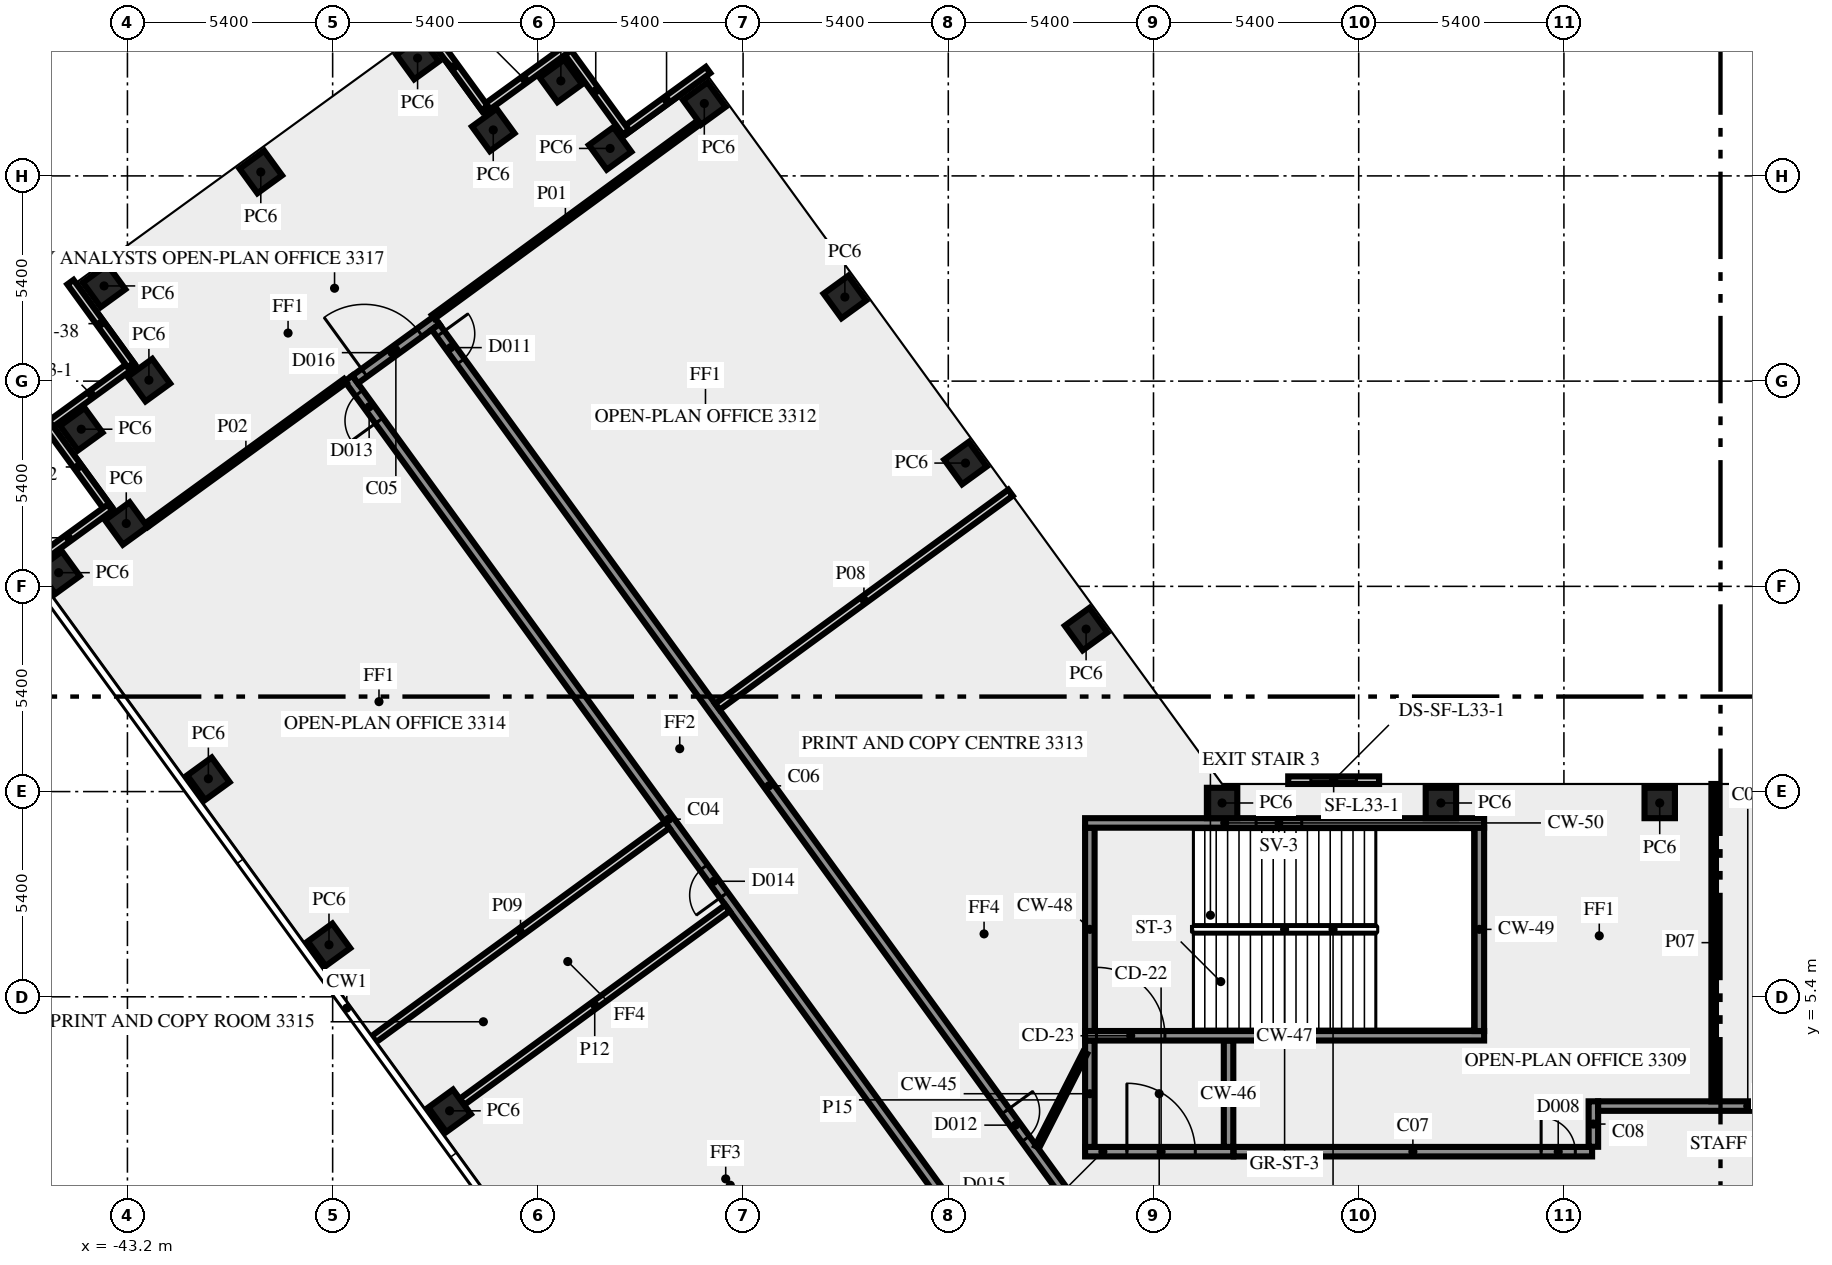
"""IFC4 building model, lengths in metres.
Left out: names, types, materials, properties, quantities, classifications, styles, units other than length and angle.
Written with IfcOpenShell. Run it as: python <this file> out.ifc"""

import sys

from ifc_helpers import new_model, si_unit, direction, frame, frame_2d, origin, origin_2d, place, context, subcontext, project, spatial, rectangle, extrude, element, fill, save


model = new_model("IFC4")
c1 = context("Model", 3, precision=1e-05, world=origin(), true_north=direction((0.0, 1.0)))
c2 = subcontext(c1, "Body", "Model", "MODEL_VIEW")
j1 = project(units=[si_unit("LENGTHUNIT", "METRE"), si_unit("PLANEANGLEUNIT", "RADIAN")], contexts=[c1])
p1 = place(None, origin())
s1 = spatial("IfcSite", under=j1, at=p1, CompositionType="ELEMENT")
p2 = place(p1, origin())
s2 = spatial("IfcBuilding", under=s1, at=p2, CompositionType="ELEMENT")
p3 = place(p2, frame((0.0, 0.0, 144.0)))
s3 = spatial("IfcBuildingStorey", under=s2, at=p3, CompositionType="ELEMENT", Elevation=144.0)
for number, where, z_axis, x_axis in (
    (1, (-17.974, 15.075, 0.0), (0.0, 0.0, 1.0), (-0.588, 0.809, 0.0)),
    (2, (-21.147, 19.444, 0.0), (0.0, 0.0, 1.0), (-0.588, 0.809, 0.0)),
    (3, (-24.321, 23.812, 0.0), (0.0, 0.0, 1.0), (-0.588, 0.809, 0.0)),
    (4, (-28.02, 28.905, 0.0), (0.0, 0.0, 1.0), (-0.809, -0.588, 0.0)),
    (5, (-30.499, 27.723, 0.0), (0.0, 0.0, 1.0), (-0.809, -0.588, 0.0)),
    (6, (-31.795, 29.5, 0.0), (0.0, 0.0, 1.0), (-0.588, 0.809, 0.0)),
    (7, (-33.574, 28.209, 0.0), (0.0, 0.0, 1.0), (-0.588, 0.809, 0.0)),
    (8, (-35.565, 30.1, 0.0), (0.0, 0.0, 1.0), (-0.809, -0.588, 0.0)),
    (9, (-39.691, 27.102, 0.0), (0.0, 0.0, 1.0), (-0.809, -0.588, 0.0)),
    (10, (-43.815, 24.105, 0.0), (0.0, 0.0, 1.0), (-0.809, -0.588, 0.0)),
    (11, (-42.635, 21.626, 0.0), (0.0, 0.0, 1.0), (-0.809, -0.588, 0.0)),
    (12, (-44.415, 20.335, 0.0), (0.0, 0.0, 1.0), (0.588, -0.809, 0.0)),
    (13, (-43.231, 17.854, 0.0), (0.0, 0.0, 1.0), (0.588, -0.809, 0.0)),
    (14, (-45.01, 16.56, 0.0), (0.0, 0.0, 1.0), (0.588, -0.809, 0.0)),
    (15, (-41.07, 11.137, 0.0), (0.0, 0.0, 1.0), (0.588, -0.809, 0.0)),
    (16, (-37.896, 6.769, 0.0), (0.0, 0.0, 1.0), (0.588, -0.809, 0.0)),
    (17, (-34.722, 2.4, 0.0), (0.0, 0.0, 1.0), (0.588, -0.809, 0.0)),
    (18, (-2.879, 10.5, 0.0), (0.0, 0.0, 1.0), (-1.0, 0.0, 0.0)),
    (19, (-8.637, 10.5, 0.0), (0.0, 0.0, 1.0), (-1.0, 0.0, 0.0)),
    (20, (-14.395, 10.5, 0.0), (0.0, 0.0, 1.0), (-1.0, 0.0, 0.0)),
):
    element("IfcColumn", number, at=place(p3, frame(where, z_axis=z_axis, x_axis=x_axis)), inside=s3, PredefinedType="COLUMN", context=c2, shape_type="SweptSolid", body=[
        extrude(rectangle(XDim=0.8, YDim=0.8, at=origin_2d()), origin(), (0.0, 0.0, 1.0), 3.65),
    ])
for number, where, z_axis, x_axis in (
    (21, (-43.061, 22.043, 0.0), (0.0, 0.0, 1.0), (-0.809, -0.588, 0.0)),
    (22, (-45.296, 20.434, 0.0), (0.0, 0.0, 1.0), (0.588, -0.809, 0.0)),
    (23, (-43.658, 18.272, 0.0), (0.0, 0.0, 1.0), (-0.809, -0.588, 0.0)),
):
    element("IfcWall", number, at=place(p3, frame(where, z_axis=z_axis, x_axis=x_axis)), inside=s3, PredefinedType="SOLIDWALL", context=c2, shape_type="SweptSolid", body=[
        extrude(rectangle(XDim=2.7, YDim=0.2, at=frame_2d((1.35, 0.0))), origin(), (0.0, 0.0, 1.0), 3.65),
    ])
p4 = place(p3, frame((-10.263, 11.1, 0.0), z_axis=(0.0, 0.0, 1.0), x_axis=(-1.0, 0.0, 0.0)))
e24 = element("IfcWall", 24, at=p4, inside=s3, PredefinedType="SOLIDWALL", context=c2, shape_type="SweptSolid", body=[
    extrude(rectangle(XDim=2.392, YDim=0.2, at=frame_2d((1.196, 0.0))), origin(), (0.0, 0.0, 1.0), 3.65),
])
p5 = place(p4, frame((0.596, 0.0, 1.0)))
e25 = element("IfcOpeningElement", 25, at=p5, cuts=e24, PredefinedType="OPENING", context=c2, shape_type="SweptSolid", body=[
    extrude(rectangle(XDim=1.2, YDim=1.2, at=frame_2d((0.6, 0.6))), frame((0.0, 0.11, 0.0), z_axis=(0.0, -1.0, 0.0), x_axis=(1.0, 0.0, 0.0)), (0.0, 0.0, 1.0), 0.22),
])
for number, where, z_axis, x_axis in (
    (26, (-27.921, 29.787, 0.0), (0.0, 0.0, 1.0), (-0.809, -0.588, 0.0)),
    (27, (-30.083, 28.149, 0.0), (0.0, 0.0, 1.0), (-0.588, 0.809, 0.0)),
    (28, (-31.654, 30.331, 0.0), (0.0, 0.0, 1.0), (-0.809, -0.588, 0.0)),
    (29, (-33.801, 28.786, 0.0), (0.0, 0.0, 1.0), (-0.588, 0.809, 0.0)),
    (30, (-44.699, 24.205, 0.0), (0.0, 0.0, 1.0), (0.588, -0.809, 0.0)),
):
    element("IfcWall", number, at=place(p3, frame(where, z_axis=z_axis, x_axis=x_axis)), inside=s3, PredefinedType="SOLIDWALL", context=c2, shape_type="SweptSolid", body=[
        extrude(rectangle(XDim=2.7, YDim=0.2, at=frame_2d((1.35, 0.0))), origin(), (0.0, 0.0, 1.0), 3.65),
    ])
p6 = place(p3, frame((-18.0, 1.325, 0.0), z_axis=(0.0, 0.0, 1.0), x_axis=(1.0, 0.0, 0.0)))
e31 = element("IfcWall", 31, at=p6, inside=s3, PredefinedType="SHEAR", context=c2, shape_type="SweptSolid", body=[
    extrude(rectangle(XDim=3.9, YDim=0.25, at=frame_2d((1.95, 0.0))), origin(), (0.0, 0.0, 1.0), 3.65),
])
p7 = place(p6, frame((1.1, 0.0, 0.0)))
e32 = element("IfcOpeningElement", 32, at=p7, cuts=e31, PredefinedType="OPENING", context=c2, shape_type="SweptSolid", body=[
    extrude(rectangle(XDim=1.8, YDim=2.1, at=frame_2d((0.9, 1.05))), frame((0.0, 0.135, 0.0), z_axis=(0.0, -1.0, 0.0), x_axis=(1.0, 0.0, 0.0)), (0.0, 0.0, 1.0), 0.27),
])
for number, where, z_axis, x_axis in (
    (33, (-17.875, 1.45, 0.0), (0.0, 0.0, 1.0), (0.0, 1.0, 0.0)),
    (34, (-14.225, 1.45, 0.0), (0.0, 0.0, 1.0), (0.0, 1.0, 0.0)),
):
    element("IfcWall", number, at=place(p3, frame(where, z_axis=z_axis, x_axis=x_axis)), inside=s3, PredefinedType="SHEAR", context=c2, shape_type="SweptSolid", body=[
        extrude(rectangle(XDim=2.8, YDim=0.25, at=frame_2d((1.4, 0.0))), origin(), (0.0, 0.0, 1.0), 3.65),
    ])
p8 = place(p3, frame((-18.0, 4.375, 0.0), z_axis=(0.0, 0.0, 1.0), x_axis=(1.0, 0.0, 0.0)))
e35 = element("IfcWall", 35, at=p8, inside=s3, PredefinedType="SHEAR", context=c2, shape_type="SweptSolid", body=[
    extrude(rectangle(XDim=10.5, YDim=0.25, at=frame_2d((5.25, 0.0))), origin(), (0.0, 0.0, 1.0), 3.65),
])
p9 = place(p8, frame((0.3, 0.0, 0.0)))
e36 = element("IfcOpeningElement", 36, at=p9, cuts=e35, PredefinedType="OPENING", context=c2, shape_type="SweptSolid", body=[
    extrude(rectangle(XDim=1.8, YDim=2.1, at=frame_2d((0.9, 1.05))), frame((0.0, 0.135, 0.0), z_axis=(0.0, -1.0, 0.0), x_axis=(1.0, 0.0, 0.0)), (0.0, 0.0, 1.0), 0.27),
])
for number, where, z_axis, x_axis in (
    (37, (-17.875, 4.5, 0.0), (0.0, 0.0, 1.0), (0.0, 1.0, 0.0)),
    (38, (-7.625, 4.5, 0.0), (0.0, 0.0, 1.0), (0.0, 1.0, 0.0)),
):
    element("IfcWall", number, at=place(p3, frame(where, z_axis=z_axis, x_axis=x_axis)), inside=s3, PredefinedType="SHEAR", context=c2, shape_type="SweptSolid", body=[
        extrude(rectangle(XDim=5.35, YDim=0.25, at=frame_2d((2.675, 0.0))), origin(), (0.0, 0.0, 1.0), 3.65),
    ])
p10 = place(p3, frame((-18.0, 9.975, 0.0), z_axis=(0.0, 0.0, 1.0), x_axis=(1.0, 0.0, 0.0)))
e39 = element("IfcWall", 39, at=p10, inside=s3, PredefinedType="SHEAR", context=c2, shape_type="SweptSolid", body=[
    extrude(rectangle(XDim=10.5, YDim=0.25, at=frame_2d((5.25, 0.0))), origin(), (0.0, 0.0, 1.0), 3.65),
])
p11 = place(p10, frame((4.5, 0.0, 1.0)))
e40 = element("IfcOpeningElement", 40, at=p11, cuts=e39, PredefinedType="OPENING", context=c2, shape_type="SweptSolid", body=[
    extrude(rectangle(XDim=1.2, YDim=1.2, at=frame_2d((0.6, 0.6))), frame((0.0, 0.135, 0.0), z_axis=(0.0, -1.0, 0.0), x_axis=(1.0, 0.0, 0.0)), (0.0, 0.0, 1.0), 0.27),
])
p12 = place(p3, frame((-20.531, -1.523, 0.0), z_axis=(0.0, 0.0, 1.0), x_axis=(-0.587785812891, 0.809016587076, 0.0)))
e41 = element("IfcWall", 41, at=p12, inside=s3, PredefinedType="SOLIDWALL", context=c2, shape_type="SweptSolid", body=[
    extrude(rectangle(XDim=28.67, YDim=0.25, at=frame_2d((14.335, 0.0))), origin(), (0.0, 0.0, 1.0), 3.65),
])
p13 = place(p12, frame((27.296, 0.0, 0.0)))
e42 = element("IfcOpeningElement", 42, at=p13, cuts=e41, PredefinedType="OPENING", context=c2, shape_type="SweptSolid", body=[
    extrude(rectangle(XDim=0.9, YDim=2.1, at=frame_2d((0.45, 1.05))), frame((0.0, 0.135, 0.0), z_axis=(0.0, -1.0, 0.0), x_axis=(1.0, 0.0, 0.0)), (0.0, 0.0, 1.0), 0.27),
])
p14 = place(p12, frame((11.866, 0.0, 0.0)))
e43 = element("IfcOpeningElement", 43, at=p14, cuts=e41, PredefinedType="OPENING", context=c2, shape_type="SweptSolid", body=[
    extrude(rectangle(XDim=0.9, YDim=2.1, at=frame_2d((0.45, 1.05))), frame((0.0, 0.135, 0.0), z_axis=(0.0, -1.0, 0.0), x_axis=(1.0, 0.0, 0.0)), (0.0, 0.0, 1.0), 0.27),
])
p15 = place(p12, frame((0.533, 0.0, 0.0)))
e44 = element("IfcOpeningElement", 44, at=p15, cuts=e41, PredefinedType="OPENING", context=c2, shape_type="SweptSolid", body=[
    extrude(rectangle(XDim=0.9, YDim=2.1, at=frame_2d((0.45, 1.05))), frame((0.0, 0.135, 0.0), z_axis=(0.0, -1.0, 0.0), x_axis=(1.0, 0.0, 0.0)), (0.0, 0.0, 1.0), 0.27),
])
p16 = place(p3, frame((-37.208, 21.644, 0.0), z_axis=(0.0, 0.0, 1.0), x_axis=(0.809038743598, 0.587755315891, 0.0)))
e45 = element("IfcWall", 45, at=p16, inside=s3, PredefinedType="SOLIDWALL", context=c2, shape_type="SweptSolid", body=[
    extrude(rectangle(XDim=2.65, YDim=0.25, at=frame_2d((1.325, 0.0))), origin(), (0.0, 0.0, 1.0), 3.65),
])
p17 = place(p16, frame((0.3, 0.0, 0.0)))
e46 = element("IfcOpeningElement", 46, at=p17, cuts=e45, PredefinedType="OPENING", context=c2, shape_type="SweptSolid", body=[
    extrude(rectangle(XDim=1.8, YDim=2.1, at=frame_2d((0.9, 1.05))), frame((0.0, 0.135, 0.0), z_axis=(0.0, -1.0, 0.0), x_axis=(1.0, 0.0, 0.0)), (0.0, 0.0, 1.0), 0.27),
])
p18 = place(p3, frame((-35.092, 23.027, 0.0), z_axis=(0.0, 0.0, 1.0), x_axis=(0.587784076945, -0.809017848313, 0.0)))
e47 = element("IfcWall", 47, at=p18, inside=s3, PredefinedType="SOLIDWALL", context=c2, shape_type="SweptSolid", body=[
    extrude(rectangle(XDim=29.853, YDim=0.25, at=frame_2d((14.927, 0.0))), origin(), (0.0, 0.0, 1.0), 3.65),
])
p19 = place(p18, frame((0.224, 0.0, 0.0)))
e48 = element("IfcOpeningElement", 48, at=p19, cuts=e47, PredefinedType="OPENING", context=c2, shape_type="SweptSolid", body=[
    extrude(rectangle(XDim=0.9, YDim=2.1, at=frame_2d((0.45, 1.05))), frame((0.0, 0.135, 0.0), z_axis=(0.0, -1.0, 0.0), x_axis=(1.0, 0.0, 0.0)), (0.0, 0.0, 1.0), 0.27),
])
p20 = place(p18, frame((25.512, 0.0, 0.0)))
e49 = element("IfcOpeningElement", 49, at=p20, cuts=e47, PredefinedType="OPENING", context=c2, shape_type="SweptSolid", body=[
    extrude(rectangle(XDim=0.9, YDim=2.1, at=frame_2d((0.45, 1.05))), frame((0.0, 0.135, 0.0), z_axis=(0.0, -1.0, 0.0), x_axis=(1.0, 0.0, 0.0)), (0.0, 0.0, 1.0), 0.27),
])
p21 = place(p3, frame((-14.09, 1.325, 0.0), z_axis=(0.0, 0.0, 1.0), x_axis=(1.0, 0.0, 0.0)))
e50 = element("IfcWall", 50, at=p21, inside=s3, PredefinedType="SOLIDWALL", context=c2, shape_type="SweptSolid", body=[
    extrude(rectangle(XDim=9.431, YDim=0.25, at=frame_2d((4.716, 0.0))), origin(), (0.0, 0.0, 1.0), 3.65),
])
p22 = place(p21, frame((8.09, 0.0, 0.0)))
e51 = element("IfcOpeningElement", 51, at=p22, cuts=e50, PredefinedType="OPENING", context=c2, shape_type="SweptSolid", body=[
    extrude(rectangle(XDim=0.9, YDim=2.1, at=frame_2d((0.45, 1.05))), frame((0.0, 0.135, 0.0), z_axis=(0.0, -1.0, 0.0), x_axis=(1.0, 0.0, 0.0)), (0.0, 0.0, 1.0), 0.27),
])
p23 = place(p3, frame((-4.625, 1.454, 0.0), z_axis=(0.0, 0.0, 1.0), x_axis=(0.0, 1.0, 0.0)))
e52 = element("IfcWall", 52, at=p23, inside=s3, PredefinedType="SOLIDWALL", context=c2, shape_type="SweptSolid", body=[
    extrude(rectangle(XDim=1.196, YDim=0.25, at=frame_2d((0.598, 0.0))), origin(), (0.0, 0.0, 1.0), 3.65),
])
p24 = place(p3, frame((-4.5, 2.525, 0.0), z_axis=(0.0, 0.0, 1.0), x_axis=(1.0, 0.0, 0.0)))
e53 = element("IfcWall", 53, at=p24, inside=s3, PredefinedType="SOLIDWALL", context=c2, shape_type="SweptSolid", body=[
    extrude(rectangle(XDim=11.25, YDim=0.25, at=frame_2d((5.625, 0.0))), origin(), (0.0, 0.0, 1.0), 3.65),
])
p25 = place(p24, frame((4.689, 0.0, 0.0)))
e54 = element("IfcOpeningElement", 54, at=p25, cuts=e53, PredefinedType="OPENING", context=c2, shape_type="SweptSolid", body=[
    extrude(rectangle(XDim=0.9, YDim=2.1, at=frame_2d((0.45, 1.05))), frame((0.0, 0.135, 0.0), z_axis=(0.0, -1.0, 0.0), x_axis=(1.0, 0.0, 0.0)), (0.0, 0.0, 1.0), 0.27),
])
p26 = place(p3, frame((-35.154, 23.291, 0.0), z_axis=(0.0, 0.0, 1.0), x_axis=(0.806977317905, 0.590582431492, 0.0)))
e55 = element("IfcWall", 55, at=p26, inside=s3, PredefinedType="PARTITIONING", context=c2, shape_type="SweptSolid", body=[
    extrude(rectangle(XDim=8.62, YDim=0.12, at=frame_2d((4.31, 0.0))), origin(), (0.0, 0.0, 1.0), 3.65),
])
p27 = place(p3, frame((-42.698, 17.81, 0.0), z_axis=(0.0, 0.0, 1.0), x_axis=(0.80901688725, 0.587785399737, 0.0)))
e56 = element("IfcWall", 56, at=p27, inside=s3, PredefinedType="PARTITIONING", context=c2, shape_type="SweptSolid", body=[
    extrude(rectangle(XDim=6.465, YDim=0.12, at=frame_2d((3.232, 0.0))), origin(), (0.0, 0.0, 1.0), 3.65),
])
p28 = place(p3, frame((-1.459, 2.65, 0.0), z_axis=(0.0, 0.0, 1.0), x_axis=(0.0, 1.0, 0.0)))
e57 = element("IfcWall", 57, at=p28, inside=s3, PredefinedType="PARTITIONING", context=c2, shape_type="SweptSolid", body=[
    extrude(rectangle(XDim=8.35, YDim=0.12, at=frame_2d((4.175, 0.0))), origin(), (0.0, 0.0, 1.0), 2.85),
])
for number, where, z_axis, x_axis in (
    (58, (-27.676, 13.032, 0.0), (0.0, 0.0, 1.0), (0.808, 0.59, 0.0)),
    (59, (-36.712, 4.288, 0.0), (0.0, 0.0, 1.0), (0.808, 0.59, 0.0)),
):
    element("IfcWall", number, at=place(p3, frame(where, z_axis=z_axis, x_axis=x_axis)), inside=s3, PredefinedType="SOLIDWALL", context=c2, shape_type="SweptSolid", body=[
        extrude(rectangle(XDim=9.55, YDim=0.2, at=frame_2d((4.775, 0.0))), origin(), (0.0, 0.0, 1.0), 2.85),
    ])
p29 = place(p3, frame((-34.395, 2.638, 0.0), z_axis=(0.0, 0.0, 1.0), x_axis=(0.807657534767, 0.589651851973, 0.0)))
e60 = element("IfcWall", 60, at=p29, inside=s3, PredefinedType="SOLIDWALL", context=c2, shape_type="SweptSolid", body=[
    extrude(rectangle(XDim=8.644, YDim=0.2, at=frame_2d((4.322, 0.0))), origin(), (0.0, 0.0, 1.0), 3.65),
])
p30 = place(p3, frame((-19.261, 1.45, 0.0), z_axis=(0.0, 0.0, 1.0), x_axis=(0.453950796792, 0.891026752736, 0.0)))
e61 = element("IfcWall", 61, at=p30, inside=s3, PredefinedType="PARTITIONING", context=c2, shape_type="SweptSolid", body=[
    extrude(rectangle(XDim=2.778, YDim=0.12, at=frame_2d((1.389, 0.0))), origin(), (0.0, 0.0, 1.0), 3.65),
])
p31 = place(p5, origin())
e62 = element("IfcWindow", 62, at=p31, inside=s3, PartitioningType="SINGLE_PANEL", PredefinedType="WINDOW", context=c2, shape_type="SweptSolid", body=[
    extrude(rectangle(XDim=1.2, YDim=1.2, at=frame_2d((0.6, 0.6))), frame((0.0, 0.03, 0.0), z_axis=(0.0, -1.0, 0.0), x_axis=(1.0, 0.0, 0.0)), (0.0, 0.0, 1.0), 0.06),
])
fill(e25, e62)
p32 = place(p7, origin())
e63 = element("IfcDoor", 63, at=p32, inside=s3, OperationType="DOUBLE_DOOR_SINGLE_SWING", PredefinedType="DOOR", context=c2, shape_type="SweptSolid", body=[
    extrude(rectangle(XDim=1.8, YDim=2.1, at=frame_2d((0.9, 1.05))), frame((0.0, 0.025, 0.0), z_axis=(0.0, -1.0, 0.0), x_axis=(1.0, 0.0, 0.0)), (0.0, 0.0, 1.0), 0.05),
])
fill(e32, e63)
p33 = place(p9, origin())
e64 = element("IfcDoor", 64, at=p33, inside=s3, OperationType="DOUBLE_DOOR_SINGLE_SWING", PredefinedType="DOOR", context=c2, shape_type="SweptSolid", body=[
    extrude(rectangle(XDim=1.8, YDim=2.1, at=frame_2d((0.9, 1.05))), frame((0.0, 0.025, 0.0), z_axis=(0.0, -1.0, 0.0), x_axis=(1.0, 0.0, 0.0)), (0.0, 0.0, 1.0), 0.05),
])
fill(e36, e64)
p34 = place(p11, origin())
e65 = element("IfcWindow", 65, at=p34, inside=s3, PartitioningType="SINGLE_PANEL", PredefinedType="WINDOW", context=c2, shape_type="SweptSolid", body=[
    extrude(rectangle(XDim=1.2, YDim=1.2, at=frame_2d((0.6, 0.6))), frame((0.0, 0.03, 0.0), z_axis=(0.0, -1.0, 0.0), x_axis=(1.0, 0.0, 0.0)), (0.0, 0.0, 1.0), 0.06),
])
fill(e40, e65)
p35 = place(p17, origin())
e66 = element("IfcDoor", 66, at=p35, inside=s3, OperationType="DOUBLE_DOOR_SINGLE_SWING", PredefinedType="DOOR", context=c2, shape_type="SweptSolid", body=[
    extrude(rectangle(XDim=1.8, YDim=2.1, at=frame_2d((0.9, 1.05))), frame((0.0, 0.025, 0.0), z_axis=(0.0, -1.0, 0.0), x_axis=(1.0, 0.0, 0.0)), (0.0, 0.0, 1.0), 0.05),
])
fill(e46, e66)
p36 = place(p22, origin())
e67 = element("IfcDoor", 67, at=p36, inside=s3, OperationType="SINGLE_SWING_RIGHT", PredefinedType="DOOR", context=c2, shape_type="SweptSolid", body=[
    extrude(rectangle(XDim=0.9, YDim=2.1, at=frame_2d((0.45, 1.05))), frame((0.0, 0.025, 0.0), z_axis=(0.0, -1.0, 0.0), x_axis=(1.0, 0.0, 0.0)), (0.0, 0.0, 1.0), 0.05),
])
fill(e51, e67)
p37 = place(p19, origin())
e68 = element("IfcDoor", 68, at=p37, inside=s3, OperationType="SINGLE_SWING_LEFT", PredefinedType="DOOR", context=c2, shape_type="SweptSolid", body=[
    extrude(rectangle(XDim=0.9, YDim=2.1, at=frame_2d((0.45, 1.05))), frame((0.0, 0.025, 0.0), z_axis=(0.0, -1.0, 0.0), x_axis=(1.0, 0.0, 0.0)), (0.0, 0.0, 1.0), 0.05),
])
fill(e48, e68)
p38 = place(p13, origin())
e69 = element("IfcDoor", 69, at=p38, inside=s3, OperationType="SINGLE_SWING_RIGHT", PredefinedType="DOOR", context=c2, shape_type="SweptSolid", body=[
    extrude(rectangle(XDim=0.9, YDim=2.1, at=frame_2d((0.45, 1.05))), frame((0.0, 0.025, 0.0), z_axis=(0.0, -1.0, 0.0), x_axis=(1.0, 0.0, 0.0)), (0.0, 0.0, 1.0), 0.05),
])
fill(e42, e69)
p39 = place(p20, origin())
e70 = element("IfcDoor", 70, at=p39, inside=s3, OperationType="SINGLE_SWING_RIGHT", PredefinedType="DOOR", context=c2, shape_type="SweptSolid", body=[
    extrude(rectangle(XDim=0.9, YDim=2.1, at=frame_2d((0.45, 1.05))), frame((0.0, 0.025, 0.0), z_axis=(0.0, -1.0, 0.0), x_axis=(1.0, 0.0, 0.0)), (0.0, 0.0, 1.0), 0.05),
])
fill(e49, e70)
p40 = place(p14, origin())
e71 = element("IfcDoor", 71, at=p40, inside=s3, OperationType="SINGLE_SWING_LEFT", PredefinedType="DOOR", context=c2, shape_type="SweptSolid", body=[
    extrude(rectangle(XDim=0.9, YDim=2.1, at=frame_2d((0.45, 1.05))), frame((0.0, 0.025, 0.0), z_axis=(0.0, -1.0, 0.0), x_axis=(1.0, 0.0, 0.0)), (0.0, 0.0, 1.0), 0.05),
])
fill(e43, e71)
save(model, sys.argv[1])
